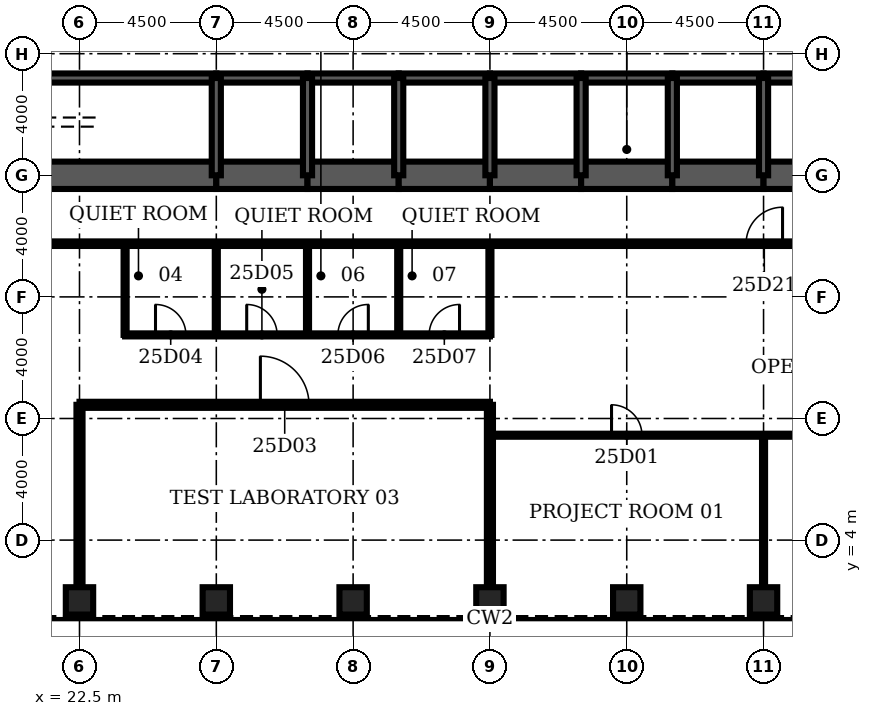
"""IFC4 building model, lengths in metres.
Left out: names, types, materials, properties, quantities, classifications, styles, units other than length and angle.
Written with IfcOpenShell. Run it as: python <this file> out.ifc"""

import sys

from ifc_helpers import new_model, si_unit, direction, frame, frame_2d, origin, origin_2d, place, context, subcontext, project, spatial, rectangle, hollow_rectangle, extrude, element, fill, save


model = new_model("IFC4")
c1 = context("Model", 3, precision=1e-05, world=origin(), true_north=direction((0.0, 1.0)))
c2 = subcontext(c1, "Body", "Model", "MODEL_VIEW")
j1 = project(units=[si_unit("LENGTHUNIT", "METRE"), si_unit("PLANEANGLEUNIT", "RADIAN")], contexts=[c1])
p1 = place(None, origin())
s1 = spatial("IfcSite", under=j1, at=p1, CompositionType="ELEMENT")
p2 = place(p1, origin())
s2 = spatial("IfcBuilding", under=s1, at=p2, CompositionType="ELEMENT")
p3 = place(p2, frame((0.0, 0.0, 117.3)))
s3 = spatial("IfcBuildingStorey", under=s2, at=p3, CompositionType="ELEMENT", Elevation=117.3)
for number, where, z_axis, x_axis in (
    (1, (22.5, 2.0, 0.0), (0.0, 0.0, 1.0), (0.0, 1.0, 0.0)),
    (2, (27.0, 2.0, 0.0), (0.0, 0.0, 1.0), (0.0, 1.0, 0.0)),
    (3, (31.5, 2.0, 0.0), (0.0, 0.0, 1.0), (0.0, 1.0, 0.0)),
    (4, (36.0, 2.0, 0.0), (0.0, 0.0, 1.0), (0.0, 1.0, 0.0)),
    (5, (40.5, 2.0, 0.0), (0.0, 0.0, 1.0), (0.0, 1.0, 0.0)),
    (6, (45.0, 2.0, 0.0), (0.0, 0.0, 1.0), (0.0, 1.0, 0.0)),
):
    element("IfcColumn", number, at=place(p3, frame(where, z_axis=z_axis, x_axis=x_axis)), inside=s3, PredefinedType="COLUMN", context=c2, shape_type="SweptSolid", body=[
        extrude(hollow_rectangle(XDim=0.9, YDim=0.9, WallThickness=0.11, at=origin_2d()), origin(), (0.0, 0.0, 1.0), 4.2),
    ])
p4 = place(p3, frame((17.55, 16.0, 0.0), z_axis=(0.0, 0.0, 1.0), x_axis=(1.0, 0.0, 0.0)))
e7 = element("IfcWall", 7, at=p4, inside=s3, PredefinedType="SHEAR", context=c2, shape_type="SweptSolid", body=[
    extrude(rectangle(XDim=9.45, YDim=0.9, at=frame_2d((4.725, 0.0))), origin(), (0.0, 0.0, 1.0), 4.2),
])
for number, where, z_axis, x_axis in (
    (8, (27.0, 16.0, 0.0), (0.0, 0.0, 1.0), (1.0, 0.0, 0.0)),
    (9, (30.0, 16.0, 0.0), (0.0, 0.0, 1.0), (1.0, 0.0, 0.0)),
    (10, (33.0, 16.0, 0.0), (0.0, 0.0, 1.0), (1.0, 0.0, 0.0)),
    (11, (36.0, 16.0, 0.0), (0.0, 0.0, 1.0), (1.0, 0.0, 0.0)),
    (12, (39.0, 16.0, 0.0), (0.0, 0.0, 1.0), (1.0, 0.0, 0.0)),
    (13, (42.0, 16.0, 0.0), (0.0, 0.0, 1.0), (1.0, 0.0, 0.0)),
):
    element("IfcWall", number, at=place(p3, frame(where, z_axis=z_axis, x_axis=x_axis)), inside=s3, PredefinedType="SHEAR", context=c2, shape_type="SweptSolid", body=[
        extrude(rectangle(XDim=3.0, YDim=0.9, at=frame_2d((1.5, 0.0))), origin(), (0.0, 0.0, 1.0), 4.2),
    ])
p5 = place(p3, frame((45.0, 16.0, 0.0), z_axis=(0.0, 0.0, 1.0), x_axis=(1.0, 0.0, 0.0)))
e14 = element("IfcWall", 14, at=p5, inside=s3, PredefinedType="SHEAR", context=c2, shape_type="SweptSolid", body=[
    extrude(rectangle(XDim=9.45, YDim=0.9, at=frame_2d((4.725, 0.0))), origin(), (0.0, 0.0, 1.0), 4.2),
])
p6 = place(p3, frame((18.0, 19.2, 0.0), z_axis=(0.0, 0.0, 1.0), x_axis=(1.0, 0.0, 0.0)))
e15 = element("IfcWall", 15, at=p6, inside=s3, PredefinedType="SOLIDWALL", context=c2, shape_type="SweptSolid", body=[
    extrude(rectangle(XDim=9.0, YDim=0.3, at=frame_2d((4.5, 0.0))), origin(), (0.0, 0.0, 1.0), 4.2),
])
p7 = place(p6, frame((0.65, 0.0, 0.0)))
e16 = element("IfcOpeningElement", 16, at=p7, cuts=e15, PredefinedType="OPENING", context=c2, shape_type="SweptSolid", body=[
    extrude(rectangle(XDim=1.0, YDim=2.1, at=frame_2d((0.5, 1.05))), frame((0.0, 0.16, 0.0), z_axis=(0.0, -1.0, 0.0), x_axis=(1.0, 0.0, 0.0)), (0.0, 0.0, 1.0), 0.32),
])
p8 = place(p3, frame((27.0, 19.2, 0.0), z_axis=(0.0, 0.0, 1.0), x_axis=(1.0, 0.0, 0.0)))
e17 = element("IfcWall", 17, at=p8, inside=s3, PredefinedType="SOLIDWALL", context=c2, shape_type="SweptSolid", body=[
    extrude(rectangle(XDim=3.0, YDim=0.3, at=frame_2d((1.5, 0.0))), origin(), (0.0, 0.0, 1.0), 4.2),
])
p9 = place(p8, frame((0.95, 0.0, 0.0)))
e18 = element("IfcOpeningElement", 18, at=p9, cuts=e17, PredefinedType="OPENING", context=c2, shape_type="SweptSolid", body=[
    extrude(rectangle(XDim=1.1, YDim=2.2, at=frame_2d((0.55, 1.1))), frame((0.0, 0.16, 0.0), z_axis=(0.0, -1.0, 0.0), x_axis=(1.0, 0.0, 0.0)), (0.0, 0.0, 1.0), 0.32),
])
p10 = place(p3, frame((30.0, 19.2, 0.0), z_axis=(0.0, 0.0, 1.0), x_axis=(1.0, 0.0, 0.0)))
e19 = element("IfcWall", 19, at=p10, inside=s3, PredefinedType="SOLIDWALL", context=c2, shape_type="SweptSolid", body=[
    extrude(rectangle(XDim=3.0, YDim=0.3, at=frame_2d((1.5, 0.0))), origin(), (0.0, 0.0, 1.0), 4.2),
])
p11 = place(p10, frame((0.95, 0.0, 0.0)))
e20 = element("IfcOpeningElement", 20, at=p11, cuts=e19, PredefinedType="OPENING", context=c2, shape_type="SweptSolid", body=[
    extrude(rectangle(XDim=1.1, YDim=2.2, at=frame_2d((0.55, 1.1))), frame((0.0, 0.16, 0.0), z_axis=(0.0, -1.0, 0.0), x_axis=(1.0, 0.0, 0.0)), (0.0, 0.0, 1.0), 0.32),
])
p12 = place(p3, frame((33.0, 19.2, 0.0), z_axis=(0.0, 0.0, 1.0), x_axis=(1.0, 0.0, 0.0)))
e21 = element("IfcWall", 21, at=p12, inside=s3, PredefinedType="SOLIDWALL", context=c2, shape_type="SweptSolid", body=[
    extrude(rectangle(XDim=3.0, YDim=0.3, at=frame_2d((1.5, 0.0))), origin(), (0.0, 0.0, 1.0), 4.2),
])
p13 = place(p12, frame((0.95, 0.0, 0.0)))
e22 = element("IfcOpeningElement", 22, at=p13, cuts=e21, PredefinedType="OPENING", context=c2, shape_type="SweptSolid", body=[
    extrude(rectangle(XDim=1.1, YDim=2.2, at=frame_2d((0.55, 1.1))), frame((0.0, 0.16, 0.0), z_axis=(0.0, -1.0, 0.0), x_axis=(1.0, 0.0, 0.0)), (0.0, 0.0, 1.0), 0.32),
])
p14 = place(p3, frame((36.0, 19.2, 0.0), z_axis=(0.0, 0.0, 1.0), x_axis=(1.0, 0.0, 0.0)))
e23 = element("IfcWall", 23, at=p14, inside=s3, PredefinedType="SOLIDWALL", context=c2, shape_type="SweptSolid", body=[
    extrude(rectangle(XDim=3.0, YDim=0.3, at=frame_2d((1.5, 0.0))), origin(), (0.0, 0.0, 1.0), 4.2),
])
p15 = place(p14, frame((0.95, 0.0, 0.0)))
e24 = element("IfcOpeningElement", 24, at=p15, cuts=e23, PredefinedType="OPENING", context=c2, shape_type="SweptSolid", body=[
    extrude(rectangle(XDim=1.1, YDim=2.2, at=frame_2d((0.55, 1.1))), frame((0.0, 0.16, 0.0), z_axis=(0.0, -1.0, 0.0), x_axis=(1.0, 0.0, 0.0)), (0.0, 0.0, 1.0), 0.32),
])
p16 = place(p3, frame((39.0, 19.2, 0.0), z_axis=(0.0, 0.0, 1.0), x_axis=(1.0, 0.0, 0.0)))
e25 = element("IfcWall", 25, at=p16, inside=s3, PredefinedType="SOLIDWALL", context=c2, shape_type="SweptSolid", body=[
    extrude(rectangle(XDim=3.0, YDim=0.3, at=frame_2d((1.5, 0.0))), origin(), (0.0, 0.0, 1.0), 4.2),
])
p17 = place(p16, frame((1.0, 0.0, 0.0)))
e26 = element("IfcOpeningElement", 26, at=p17, cuts=e25, PredefinedType="OPENING", context=c2, shape_type="SweptSolid", body=[
    extrude(rectangle(XDim=1.0, YDim=2.1, at=frame_2d((0.5, 1.05))), frame((0.0, 0.16, 0.0), z_axis=(0.0, -1.0, 0.0), x_axis=(1.0, 0.0, 0.0)), (0.0, 0.0, 1.0), 0.32),
])
p18 = place(p3, frame((42.0, 19.2, 0.0), z_axis=(0.0, 0.0, 1.0), x_axis=(1.0, 0.0, 0.0)))
e27 = element("IfcWall", 27, at=p18, inside=s3, PredefinedType="SOLIDWALL", context=c2, shape_type="SweptSolid", body=[
    extrude(rectangle(XDim=3.0, YDim=0.3, at=frame_2d((1.5, 0.0))), origin(), (0.0, 0.0, 1.0), 4.2),
])
p19 = place(p3, frame((45.0, 19.2, 0.0), z_axis=(0.0, 0.0, 1.0), x_axis=(1.0, 0.0, 0.0)))
e28 = element("IfcWall", 28, at=p19, inside=s3, PredefinedType="SOLIDWALL", context=c2, shape_type="SweptSolid", body=[
    extrude(rectangle(XDim=9.0, YDim=0.3, at=frame_2d((4.5, 0.0))), origin(), (0.0, 0.0, 1.0), 4.2),
])
p20 = place(p19, frame((7.35, 0.0, 0.0)))
e29 = element("IfcOpeningElement", 29, at=p20, cuts=e28, PredefinedType="OPENING", context=c2, shape_type="SweptSolid", body=[
    extrude(rectangle(XDim=1.0, YDim=2.1, at=frame_2d((0.5, 1.05))), frame((0.0, 0.16, 0.0), z_axis=(0.0, -1.0, 0.0), x_axis=(1.0, 0.0, 0.0)), (0.0, 0.0, 1.0), 0.32),
])
for number, where, z_axis, x_axis in (
    (30, (27.0, 16.0, 0.0), (0.0, 0.0, 1.0), (0.0, 1.0, 0.0)),
    (31, (30.0, 16.0, 0.0), (0.0, 0.0, 1.0), (0.0, 1.0, 0.0)),
    (32, (33.0, 16.0, 0.0), (0.0, 0.0, 1.0), (0.0, 1.0, 0.0)),
    (33, (36.0, 16.0, 0.0), (0.0, 0.0, 1.0), (0.0, 1.0, 0.0)),
    (34, (39.0, 16.0, 0.0), (0.0, 0.0, 1.0), (0.0, 1.0, 0.0)),
    (35, (42.0, 16.0, 0.0), (0.0, 0.0, 1.0), (0.0, 1.0, 0.0)),
    (36, (45.0, 16.0, 0.0), (0.0, 0.0, 1.0), (0.0, 1.0, 0.0)),
):
    element("IfcWall", number, at=place(p3, frame(where, z_axis=z_axis, x_axis=x_axis)), inside=s3, PredefinedType="SOLIDWALL", context=c2, shape_type="SweptSolid", body=[
        extrude(rectangle(XDim=3.2, YDim=0.3, at=frame_2d((1.6, 0.0))), origin(), (0.0, 0.0, 1.0), 4.2),
    ])
p21 = place(p3, frame((39.15, 17.4, 0.0), z_axis=(0.0, 0.0, 1.0), x_axis=(1.0, 0.0, 0.0)))
e37 = element("IfcWall", 37, at=p21, inside=s3, PredefinedType="SOLIDWALL", context=c2, shape_type="SweptSolid", body=[
    extrude(rectangle(XDim=2.7, YDim=0.3, at=frame_2d((1.35, 0.0))), origin(), (0.0, 0.0, 1.0), 4.04),
])
p22 = place(p21, frame((0.85, 0.0, 0.0)))
e38 = element("IfcOpeningElement", 38, at=p22, cuts=e37, PredefinedType="OPENING", context=c2, shape_type="SweptSolid", body=[
    extrude(rectangle(XDim=1.0, YDim=2.1, at=frame_2d((0.5, 1.05))), frame((0.0, 0.16, 0.0), z_axis=(0.0, -1.0, 0.0), x_axis=(1.0, 0.0, 0.0)), (0.0, 0.0, 1.0), 0.32),
])
p23 = place(p3, frame((24.5, 19.35, 0.0), z_axis=(0.0, 0.0, 1.0), x_axis=(0.0, 1.0, 0.0)))
e39 = element("IfcWall", 39, at=p23, inside=s3, PredefinedType="PARTITIONING", context=c2, shape_type="SweptSolid", body=[
    extrude(rectangle(XDim=2.5, YDim=0.15, at=frame_2d((1.25, 0.0))), origin(), (0.0, 0.0, 1.0), 3.0),
])
p24 = place(p23, frame((1.15, 0.0, 0.0)))
e40 = element("IfcOpeningElement", 40, at=p24, cuts=e39, PredefinedType="OPENING", context=c2, shape_type="SweptSolid", body=[
    extrude(rectangle(XDim=1.0, YDim=2.1, at=frame_2d((0.5, 1.05))), frame((0.0, 0.085, 0.0), z_axis=(0.0, -1.0, 0.0), x_axis=(1.0, 0.0, 0.0)), (0.0, 0.0, 1.0), 0.17),
])
p25 = place(p3, frame((36.0, 7.45, 0.0), z_axis=(0.0, 0.0, 1.0), x_axis=(1.0, 0.0, 0.0)))
e41 = element("IfcWall", 41, at=p25, inside=s3, PredefinedType="PARTITIONING", context=c2, shape_type="SweptSolid", body=[
    extrude(rectangle(XDim=18.0, YDim=0.1, at=frame_2d((9.0, 0.0))), origin(), (0.0, 0.0, 1.0), 3.0),
])
p26 = place(p25, frame((4.0, 0.0, 0.0)))
e42 = element("IfcOpeningElement", 42, at=p26, cuts=e41, PredefinedType="OPENING", context=c2, shape_type="SweptSolid", body=[
    extrude(rectangle(XDim=1.0, YDim=2.1, at=frame_2d((0.5, 1.05))), frame((0.0, 0.06, 0.0), z_axis=(0.0, -1.0, 0.0), x_axis=(1.0, 0.0, 0.0)), (0.0, 0.0, 1.0), 0.12),
])
p27 = place(p25, frame((13.0, 0.0, 0.0)))
e43 = element("IfcOpeningElement", 43, at=p27, cuts=e41, PredefinedType="OPENING", context=c2, shape_type="SweptSolid", body=[
    extrude(rectangle(XDim=1.0, YDim=2.1, at=frame_2d((0.5, 1.05))), frame((0.0, 0.06, 0.0), z_axis=(0.0, -1.0, 0.0), x_axis=(1.0, 0.0, 0.0)), (0.0, 0.0, 1.0), 0.12),
])
p28 = place(p3, frame((22.5, 8.45, 0.0), z_axis=(0.0, 0.0, 1.0), x_axis=(1.0, 0.0, 0.0)))
e44 = element("IfcWall", 44, at=p28, inside=s3, PredefinedType="PARTITIONING", context=c2, shape_type="SweptSolid", body=[
    extrude(rectangle(XDim=13.5, YDim=0.2, at=frame_2d((6.75, 0.0))), origin(), (0.0, 0.0, 1.0), 3.0),
])
p29 = place(p28, frame((5.95, 0.0, 0.0)))
e45 = element("IfcOpeningElement", 45, at=p29, cuts=e44, PredefinedType="OPENING", context=c2, shape_type="SweptSolid", body=[
    extrude(rectangle(XDim=1.6, YDim=2.1, at=frame_2d((0.8, 1.05))), frame((0.0, 0.11, 0.0), z_axis=(0.0, -1.0, 0.0), x_axis=(1.0, 0.0, 0.0)), (0.0, 0.0, 1.0), 0.22),
])
p30 = place(p3, frame((24.0, 10.75, 0.0), z_axis=(0.0, 0.0, 1.0), x_axis=(1.0, 0.0, 0.0)))
e46 = element("IfcWall", 46, at=p30, inside=s3, PredefinedType="PARTITIONING", context=c2, shape_type="SweptSolid", body=[
    extrude(rectangle(XDim=12.0, YDim=0.1, at=frame_2d((6.0, 0.0))), origin(), (0.0, 0.0, 1.0), 3.0),
])
p31 = place(p30, frame((1.0, 0.0, 0.0)))
e47 = element("IfcOpeningElement", 47, at=p31, cuts=e46, PredefinedType="OPENING", context=c2, shape_type="SweptSolid", body=[
    extrude(rectangle(XDim=1.0, YDim=2.1, at=frame_2d((0.5, 1.05))), frame((0.0, 0.06, 0.0), z_axis=(0.0, -1.0, 0.0), x_axis=(1.0, 0.0, 0.0)), (0.0, 0.0, 1.0), 0.12),
])
p32 = place(p30, frame((4.0, 0.0, 0.0)))
e48 = element("IfcOpeningElement", 48, at=p32, cuts=e46, PredefinedType="OPENING", context=c2, shape_type="SweptSolid", body=[
    extrude(rectangle(XDim=1.0, YDim=2.1, at=frame_2d((0.5, 1.05))), frame((0.0, 0.06, 0.0), z_axis=(0.0, -1.0, 0.0), x_axis=(1.0, 0.0, 0.0)), (0.0, 0.0, 1.0), 0.12),
])
p33 = place(p30, frame((7.0, 0.0, 0.0)))
e49 = element("IfcOpeningElement", 49, at=p33, cuts=e46, PredefinedType="OPENING", context=c2, shape_type="SweptSolid", body=[
    extrude(rectangle(XDim=1.0, YDim=2.1, at=frame_2d((0.5, 1.05))), frame((0.0, 0.06, 0.0), z_axis=(0.0, -1.0, 0.0), x_axis=(1.0, 0.0, 0.0)), (0.0, 0.0, 1.0), 0.12),
])
p34 = place(p30, frame((10.0, 0.0, 0.0)))
e50 = element("IfcOpeningElement", 50, at=p34, cuts=e46, PredefinedType="OPENING", context=c2, shape_type="SweptSolid", body=[
    extrude(rectangle(XDim=1.0, YDim=2.1, at=frame_2d((0.5, 1.05))), frame((0.0, 0.06, 0.0), z_axis=(0.0, -1.0, 0.0), x_axis=(1.0, 0.0, 0.0)), (0.0, 0.0, 1.0), 0.12),
])
p35 = place(p3, frame((15.15, 13.75, 0.0), z_axis=(0.0, 0.0, 1.0), x_axis=(1.0, 0.0, 0.0)))
e51 = element("IfcWall", 51, at=p35, inside=s3, PredefinedType="PARTITIONING", context=c2, shape_type="SweptSolid", body=[
    extrude(rectangle(XDim=41.7, YDim=0.15, at=frame_2d((20.85, 0.0))), origin(), (0.0, 0.0, 1.0), 3.0),
])
p36 = place(p35, frame((29.275, 0.0, 0.0)))
e52 = element("IfcOpeningElement", 52, at=p36, cuts=e51, PredefinedType="OPENING", context=c2, shape_type="SweptSolid", body=[
    extrude(rectangle(XDim=1.2, YDim=2.1, at=frame_2d((0.6, 1.05))), frame((0.0, 0.085, 0.0), z_axis=(0.0, -1.0, 0.0), x_axis=(1.0, 0.0, 0.0)), (0.0, 0.0, 1.0), 0.17),
])
p37 = place(p3, frame((22.5, 2.45, 0.0), z_axis=(0.0, 0.0, 1.0), x_axis=(0.0, 1.0, 0.0)))
e53 = element("IfcWall", 53, at=p37, inside=s3, PredefinedType="PARTITIONING", context=c2, shape_type="SweptSolid", body=[
    extrude(rectangle(XDim=6.0, YDim=0.2, at=frame_2d((3.0, 0.0))), origin(), (0.0, 0.0, 1.0), 3.0),
])
for number, where, z_axis, x_axis in (
    (54, (24.0, 10.75, 0.0), (0.0, 0.0, 1.0), (0.0, 1.0, 0.0)),
    (55, (27.0, 10.75, 0.0), (0.0, 0.0, 1.0), (0.0, 1.0, 0.0)),
    (56, (30.0, 10.75, 0.0), (0.0, 0.0, 1.0), (0.0, 1.0, 0.0)),
    (57, (33.0, 10.75, 0.0), (0.0, 0.0, 1.0), (0.0, 1.0, 0.0)),
):
    element("IfcWall", number, at=place(p3, frame(where, z_axis=z_axis, x_axis=x_axis)), inside=s3, PredefinedType="PARTITIONING", context=c2, shape_type="SweptSolid", body=[
        extrude(rectangle(XDim=3.0, YDim=0.1, at=frame_2d((1.5, 0.0))), origin(), (0.0, 0.0, 1.0), 3.0),
    ])
p38 = place(p3, frame((36.0, 2.45, 0.0), z_axis=(0.0, 0.0, 1.0), x_axis=(0.0, 1.0, 0.0)))
e58 = element("IfcWall", 58, at=p38, inside=s3, PredefinedType="PARTITIONING", context=c2, shape_type="SweptSolid", body=[
    extrude(rectangle(XDim=6.0, YDim=0.2, at=frame_2d((3.0, 0.0))), origin(), (0.0, 0.0, 1.0), 3.0),
])
p39 = place(p3, frame((36.0, 10.75, 0.0), z_axis=(0.0, 0.0, 1.0), x_axis=(0.0, 1.0, 0.0)))
e59 = element("IfcWall", 59, at=p39, inside=s3, PredefinedType="PARTITIONING", context=c2, shape_type="SweptSolid", body=[
    extrude(rectangle(XDim=3.0, YDim=0.1, at=frame_2d((1.5, 0.0))), origin(), (0.0, 0.0, 1.0), 3.0),
])
p40 = place(p3, frame((45.0, 2.45, 0.0), z_axis=(0.0, 0.0, 1.0), x_axis=(0.0, 1.0, 0.0)))
e60 = element("IfcWall", 60, at=p40, inside=s3, PredefinedType="PARTITIONING", context=c2, shape_type="SweptSolid", body=[
    extrude(rectangle(XDim=5.0, YDim=0.1, at=frame_2d((2.5, 0.0))), origin(), (0.0, 0.0, 1.0), 3.0),
])
p41 = place(p22, origin())
e61 = element("IfcDoor", 61, at=p41, inside=s3, OperationType="SINGLE_SWING_LEFT", PredefinedType="DOOR", context=c2, shape_type="SweptSolid", body=[
    extrude(rectangle(XDim=1.0, YDim=2.1, at=frame_2d((0.5, 1.05))), frame((0.0, 0.025, 0.0), z_axis=(0.0, -1.0, 0.0), x_axis=(1.0, 0.0, 0.0)), (0.0, 0.0, 1.0), 0.05),
])
fill(e38, e61)
p42 = place(p26, origin())
e62 = element("IfcDoor", 62, at=p42, inside=s3, OperationType="SINGLE_SWING_LEFT", PredefinedType="DOOR", context=c2, shape_type="SweptSolid", body=[
    extrude(rectangle(XDim=1.0, YDim=2.1, at=frame_2d((0.5, 1.05))), frame((0.0, 0.025, 0.0), z_axis=(0.0, -1.0, 0.0), x_axis=(1.0, 0.0, 0.0)), (0.0, 0.0, 1.0), 0.05),
])
fill(e42, e62)
p43 = place(p29, origin())
e63 = element("IfcDoor", 63, at=p43, inside=s3, OperationType="SINGLE_SWING_LEFT", PredefinedType="DOOR", context=c2, shape_type="SweptSolid", body=[
    extrude(rectangle(XDim=1.6, YDim=2.1, at=frame_2d((0.8, 1.05))), frame((0.0, 0.025, 0.0), z_axis=(0.0, -1.0, 0.0), x_axis=(1.0, 0.0, 0.0)), (0.0, 0.0, 1.0), 0.05),
])
fill(e45, e63)
p44 = place(p31, origin())
e64 = element("IfcDoor", 64, at=p44, inside=s3, OperationType="SINGLE_SWING_LEFT", PredefinedType="DOOR", context=c2, shape_type="SweptSolid", body=[
    extrude(rectangle(XDim=1.0, YDim=2.1, at=frame_2d((0.5, 1.05))), frame((0.0, 0.025, 0.0), z_axis=(0.0, -1.0, 0.0), x_axis=(1.0, 0.0, 0.0)), (0.0, 0.0, 1.0), 0.05),
])
fill(e47, e64)
p45 = place(p32, origin())
e65 = element("IfcDoor", 65, at=p45, inside=s3, OperationType="SINGLE_SWING_LEFT", PredefinedType="DOOR", context=c2, shape_type="SweptSolid", body=[
    extrude(rectangle(XDim=1.0, YDim=2.1, at=frame_2d((0.5, 1.05))), frame((0.0, 0.025, 0.0), z_axis=(0.0, -1.0, 0.0), x_axis=(1.0, 0.0, 0.0)), (0.0, 0.0, 1.0), 0.05),
])
fill(e48, e65)
p46 = place(p33, origin())
e66 = element("IfcDoor", 66, at=p46, inside=s3, OperationType="SINGLE_SWING_RIGHT", PredefinedType="DOOR", context=c2, shape_type="SweptSolid", body=[
    extrude(rectangle(XDim=1.0, YDim=2.1, at=frame_2d((0.5, 1.05))), frame((0.0, 0.025, 0.0), z_axis=(0.0, -1.0, 0.0), x_axis=(1.0, 0.0, 0.0)), (0.0, 0.0, 1.0), 0.05),
])
fill(e49, e66)
p47 = place(p34, origin())
e67 = element("IfcDoor", 67, at=p47, inside=s3, OperationType="SINGLE_SWING_RIGHT", PredefinedType="DOOR", context=c2, shape_type="SweptSolid", body=[
    extrude(rectangle(XDim=1.0, YDim=2.1, at=frame_2d((0.5, 1.05))), frame((0.0, 0.025, 0.0), z_axis=(0.0, -1.0, 0.0), x_axis=(1.0, 0.0, 0.0)), (0.0, 0.0, 1.0), 0.05),
])
fill(e50, e67)
p48 = place(p36, origin())
e68 = element("IfcDoor", 68, at=p48, inside=s3, OperationType="SINGLE_SWING_RIGHT", PredefinedType="DOOR", context=c2, shape_type="SweptSolid", body=[
    extrude(rectangle(XDim=1.2, YDim=2.1, at=frame_2d((0.6, 1.05))), frame((0.0, 0.025, 0.0), z_axis=(0.0, -1.0, 0.0), x_axis=(1.0, 0.0, 0.0)), (0.0, 0.0, 1.0), 0.05),
])
fill(e52, e68)
p49 = place(p9, origin())
e69 = element("IfcDoor", 69, at=p49, inside=s3, OperationType="DOUBLE_DOOR_SLIDING", PredefinedType="USERDEFINED", context=c2, shape_type="SweptSolid", body=[
    extrude(rectangle(XDim=1.1, YDim=2.2, at=frame_2d((0.55, 1.1))), frame((0.0, 0.025, 0.0), z_axis=(0.0, -1.0, 0.0), x_axis=(1.0, 0.0, 0.0)), (0.0, 0.0, 1.0), 0.05),
])
fill(e18, e69)
p50 = place(p11, origin())
e70 = element("IfcDoor", 70, at=p50, inside=s3, OperationType="DOUBLE_DOOR_SLIDING", PredefinedType="USERDEFINED", context=c2, shape_type="SweptSolid", body=[
    extrude(rectangle(XDim=1.1, YDim=2.2, at=frame_2d((0.55, 1.1))), frame((0.0, 0.025, 0.0), z_axis=(0.0, -1.0, 0.0), x_axis=(1.0, 0.0, 0.0)), (0.0, 0.0, 1.0), 0.05),
])
fill(e20, e70)
p51 = place(p13, origin())
e71 = element("IfcDoor", 71, at=p51, inside=s3, OperationType="DOUBLE_DOOR_SLIDING", PredefinedType="USERDEFINED", context=c2, shape_type="SweptSolid", body=[
    extrude(rectangle(XDim=1.1, YDim=2.2, at=frame_2d((0.55, 1.1))), frame((0.0, 0.025, 0.0), z_axis=(0.0, -1.0, 0.0), x_axis=(1.0, 0.0, 0.0)), (0.0, 0.0, 1.0), 0.05),
])
fill(e22, e71)
p52 = place(p15, origin())
e72 = element("IfcDoor", 72, at=p52, inside=s3, OperationType="DOUBLE_DOOR_SLIDING", PredefinedType="USERDEFINED", context=c2, shape_type="SweptSolid", body=[
    extrude(rectangle(XDim=1.1, YDim=2.2, at=frame_2d((0.55, 1.1))), frame((0.0, 0.025, 0.0), z_axis=(0.0, -1.0, 0.0), x_axis=(1.0, 0.0, 0.0)), (0.0, 0.0, 1.0), 0.05),
])
fill(e24, e72)
p53 = place(p17, origin())
e73 = element("IfcDoor", 73, at=p53, inside=s3, OperationType="SINGLE_SWING_LEFT", PredefinedType="DOOR", context=c2, shape_type="SweptSolid", body=[
    extrude(rectangle(XDim=1.0, YDim=2.1, at=frame_2d((0.5, 1.05))), frame((0.0, 0.025, 0.0), z_axis=(0.0, -1.0, 0.0), x_axis=(1.0, 0.0, 0.0)), (0.0, 0.0, 1.0), 0.05),
])
fill(e26, e73)
save(model, sys.argv[1])
